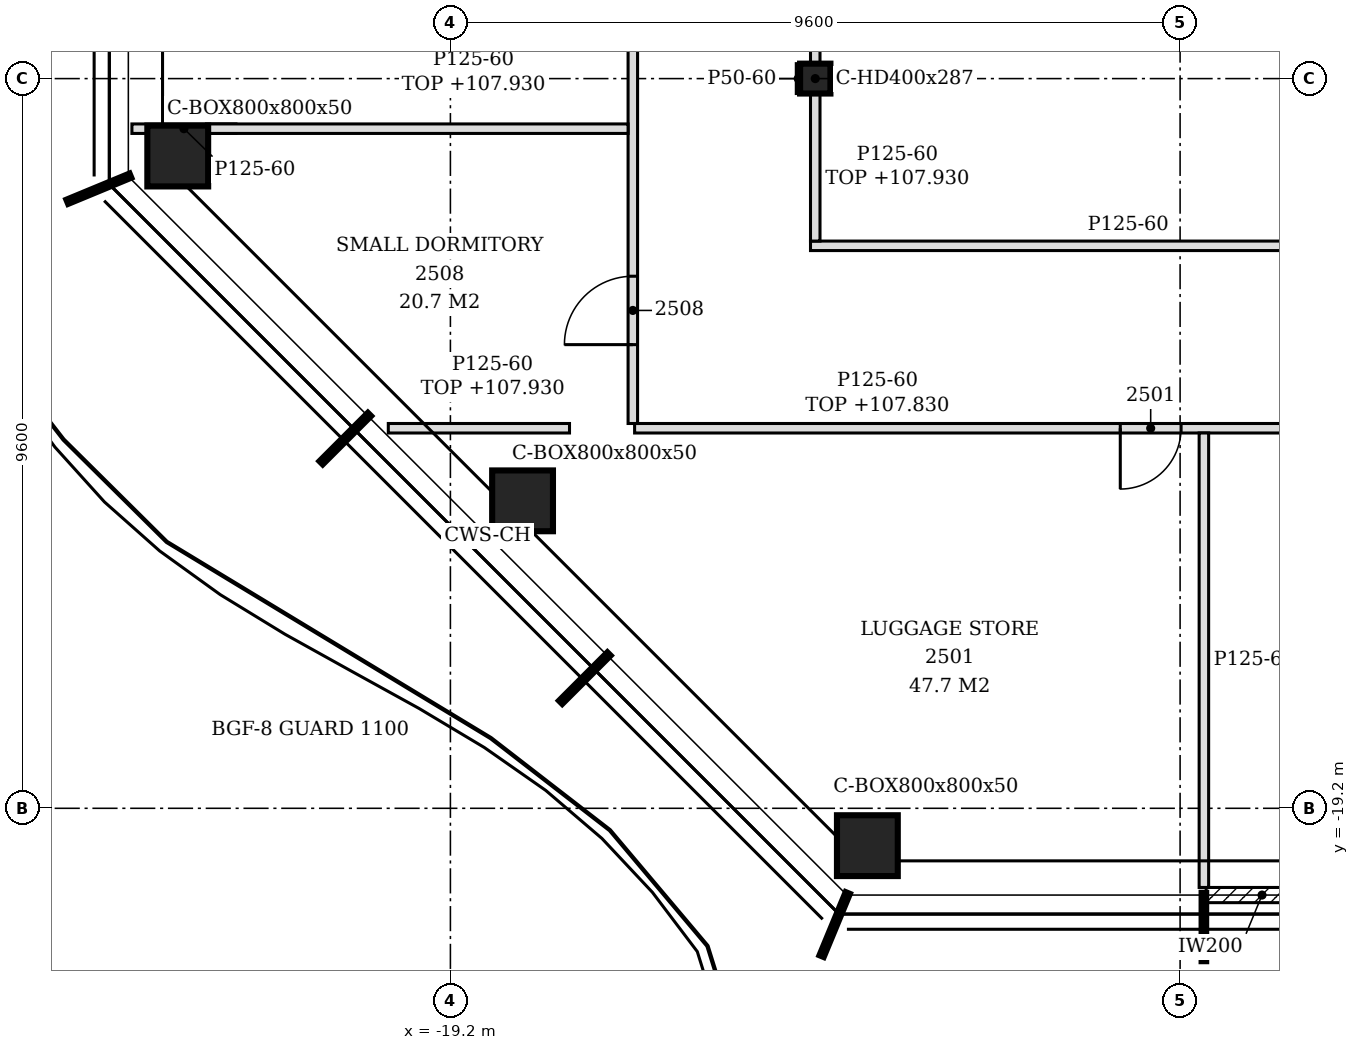
"""IFC4 building model, lengths in metres.
Left out: names, types, materials, properties, quantities, classifications, styles, units other than length and angle.
Written with IfcOpenShell. Run it as: python <this file> out.ifc"""

import sys

from ifc_helpers import new_model, si_unit, direction, frame, frame_2d, origin, origin_2d, place, context, subcontext, project, spatial, polyline, rectangle, hollow_rectangle, i_section, outline, extrude, clip, halfspace, element, fill, save


model = new_model("IFC4")
c1 = context("Model", 3, precision=1e-05, world=origin(), true_north=direction((0.0, 1.0)))
c2 = subcontext(c1, "Body", "Model", "MODEL_VIEW")
j1 = project(units=[si_unit("LENGTHUNIT", "METRE"), si_unit("PLANEANGLEUNIT", "RADIAN")], contexts=[c1])
p1 = place(None, origin())
s1 = spatial("IfcSite", under=j1, at=p1, CompositionType="ELEMENT")
p2 = place(p1, origin())
s2 = spatial("IfcBuilding", under=s1, at=p2, CompositionType="ELEMENT")
p3 = place(p2, frame((0.0, 0.0, 105.0)))
s3 = spatial("IfcBuildingStorey", under=s2, at=p3, CompositionType="ELEMENT", Elevation=105.0)
for number, where, z_axis, x_axis in (
    (1, (-13.714, -19.691, -0.15), (0.282, 0.188, 0.941), (-0.555, 0.832, 0.0)),
    (2, (-22.787, -10.619, -0.15), (0.282, 0.188, 0.941), (-0.555, 0.832, 0.0)),
    (3, (-18.251, -15.155, -0.15), (0.282, 0.188, 0.941), (-0.555, 0.832, 0.0)),
):
    element("IfcColumn", number, at=place(p3, frame(where, z_axis=z_axis, x_axis=x_axis)), inside=s3, PredefinedType="COLUMN", context=c2, shape_type="Clipping", body=[
        clip(clip(extrude(hollow_rectangle(XDim=0.8, YDim=0.8, WallThickness=0.05, at=origin_2d()), origin(), (0.0, 0.0, 1.0), 3.826), halfspace(frame((0.0, 0.0, 0.024), z_axis=(0.0, 0.0, 1.0), x_axis=(1.0, 0.0, 0.0)), True)), halfspace(frame((0.0, 0.0, 3.802), z_axis=(0.0, 0.0, 1.0), x_axis=(1.0, 0.0, 0.0)), False)),
    ])
p4 = place(p3, frame((-14.4, -9.6, -0.15), z_axis=(0.0, 0.0, 1.0), x_axis=(1.0, 0.0, 0.0)))
e4 = element("IfcColumn", 4, at=p4, inside=s3, PredefinedType="COLUMN", context=c2, shape_type="SweptSolid", body=[
    extrude(i_section(OverallWidth=0.399, OverallDepth=0.393, WebThickness=0.023, FlangeThickness=0.037, FilletRadius=0.015, at=origin_2d()), origin(), (0.0, 0.0, 1.0), 3.6),
])
p5 = place(p3, frame((-9.257, -20.341, 0.0), z_axis=(0.0, 0.0, 1.0), x_axis=(1.0, 0.0, 0.0)))
e5 = element("IfcWall", 5, at=p5, inside=s3, PredefinedType="NOTDEFINED", context=c2, shape_type="SweptSolid", body=[
    extrude(rectangle(XDim=4.74, YDim=0.2, at=frame_2d((2.37, 0.0))), origin(), (0.0, 0.0, 1.0), 3.45),
])
p6 = place(p5, frame((1.47, 0.0, 0.0)))
e6 = element("IfcOpeningElement", 6, at=p6, cuts=e5, PredefinedType="OPENING", context=c2, shape_type="SweptSolid", body=[
    extrude(rectangle(XDim=1.8, YDim=2.4, at=frame_2d((0.9, 1.2))), frame((0.0, 0.11, 0.0), z_axis=(0.0, -1.0, 0.0), x_axis=(1.0, 0.0, 0.0)), (0.0, 0.0, 1.0), 0.22),
])
p7 = place(p3, frame((-9.287, -20.241, 0.0), z_axis=(0.0, 0.0, 1.0), x_axis=(0.0, 1.0, 0.0)))
e7 = element("IfcWall", 7, at=p7, inside=s3, PredefinedType="PARTITIONING", context=c2, shape_type="SweptSolid", body=[
    extrude(outline(polyline([(0.0, 0.0), (5.979, 0.0), (5.979, 3.45), (5.269, 3.45), (5.267, 2.93), (5.069, 2.93), (5.067, 3.45), (1.419, 3.45), (1.417, 2.93), (1.119, 2.93), (1.117, 3.45), (0.0, 3.45), (0.0, 0.0)])), frame((0.0, 0.062, 0.0), z_axis=(0.0, -1.0, 0.0), x_axis=(1.0, 0.0, 0.0)), (0.0, 0.0, 1.0), 0.125),
])
p8 = place(p3, frame((-20.017, -14.2, 0.0), z_axis=(0.0, 0.0, 1.0), x_axis=(1.0, 0.0, 0.0)))
e8 = element("IfcWall", 8, at=p8, inside=s3, PredefinedType="PARTITIONING", context=c2, shape_type="SweptSolid", body=[
    extrude(outline(polyline([(0.0, 0.0), (2.384, 0.0), (2.384, 0.863), (2.384, 1.725), (2.384, 2.587), (2.384, 2.93), (0.0, 2.93), (0.0, 2.587), (0.0, 1.725), (0.0, 0.863), (0.0, 0.0)])), frame((0.0, 0.062, 0.0), z_axis=(0.0, -1.0, 0.0), x_axis=(1.0, 0.0, 0.0)), (0.0, 0.0, 1.0), 0.125),
])
p9 = place(p3, frame((-16.777, -14.2, 0.0), z_axis=(0.0, 0.0, 1.0), x_axis=(1.0, 0.0, 0.0)))
e9 = element("IfcWall", 9, at=p9, inside=s3, PredefinedType="PARTITIONING", context=c2, shape_type="SweptSolid", body=[
    extrude(outline(polyline([(0.0, 0.0), (42.177, 0.0), (42.177, 0.863), (42.177, 1.725), (42.177, 2.587), (42.177, 2.83), (0.0, 2.83), (0.0, 2.587), (0.0, 1.725), (0.0, 0.863), (0.0, 0.0)])), frame((0.0, 0.062, 0.0), z_axis=(0.0, -1.0, 0.0), x_axis=(1.0, 0.0, 0.0)), (0.0, 0.0, 1.0), 0.125),
])
p10 = place(p9, frame((6.39, 0.0, 0.0)))
e10 = element("IfcOpeningElement", 10, at=p10, cuts=e9, PredefinedType="OPENING", context=c2, shape_type="SweptSolid", body=[
    extrude(rectangle(XDim=0.8, YDim=2.1, at=frame_2d((0.4, 1.05))), frame((0.0, 0.073, 0.0), z_axis=(0.0, -1.0, 0.0), x_axis=(1.0, 0.0, 0.0)), (0.0, 0.0, 1.0), 0.145),
])
p11 = place(p9, frame((11.816, 0.0, 0.0)))
e11 = element("IfcOpeningElement", 11, at=p11, cuts=e9, PredefinedType="OPENING", context=c2, shape_type="SweptSolid", body=[
    extrude(rectangle(XDim=0.9, YDim=2.1, at=frame_2d((0.45, 1.05))), frame((0.0, 0.073, 0.0), z_axis=(0.0, -1.0, 0.0), x_axis=(1.0, 0.0, 0.0)), (0.0, 0.0, 1.0), 0.145),
])
p12 = place(p9, frame((15.89, 0.0, 0.0)))
e12 = element("IfcOpeningElement", 12, at=p12, cuts=e9, PredefinedType="OPENING", context=c2, shape_type="SweptSolid", body=[
    extrude(rectangle(XDim=0.9, YDim=2.1, at=frame_2d((0.45, 1.05))), frame((0.0, 0.073, 0.0), z_axis=(0.0, -1.0, 0.0), x_axis=(1.0, 0.0, 0.0)), (0.0, 0.0, 1.0), 0.145),
])
p13 = place(p9, frame((21.229, 0.0, 0.0)))
e13 = element("IfcOpeningElement", 13, at=p13, cuts=e9, PredefinedType="OPENING", context=c2, shape_type="SweptSolid", body=[
    extrude(rectangle(XDim=0.9, YDim=2.1, at=frame_2d((0.45, 1.05))), frame((0.0, 0.073, 0.0), z_axis=(0.0, -1.0, 0.0), x_axis=(1.0, 0.0, 0.0)), (0.0, 0.0, 1.0), 0.145),
])
p14 = place(p9, frame((25.49, 0.0, 0.0)))
e14 = element("IfcOpeningElement", 14, at=p14, cuts=e9, PredefinedType="OPENING", context=c2, shape_type="SweptSolid", body=[
    extrude(rectangle(XDim=0.9, YDim=2.1, at=frame_2d((0.45, 1.05))), frame((0.0, 0.073, 0.0), z_axis=(0.0, -1.0, 0.0), x_axis=(1.0, 0.0, 0.0)), (0.0, 0.0, 1.0), 0.145),
])
p15 = place(p9, frame((27.042, 0.0, 0.0)))
e15 = element("IfcOpeningElement", 15, at=p15, cuts=e9, PredefinedType="OPENING", context=c2, shape_type="SweptSolid", body=[
    extrude(rectangle(XDim=0.9, YDim=2.1, at=frame_2d((0.45, 1.05))), frame((0.0, 0.073, 0.0), z_axis=(0.0, -1.0, 0.0), x_axis=(1.0, 0.0, 0.0)), (0.0, 0.0, 1.0), 0.145),
])
p16 = place(p9, frame((33.977, 0.0, 0.0)))
e16 = element("IfcOpeningElement", 16, at=p16, cuts=e9, PredefinedType="OPENING", context=c2, shape_type="SweptSolid", body=[
    extrude(rectangle(XDim=0.9, YDim=2.1, at=frame_2d((0.45, 1.05))), frame((0.0, 0.073, 0.0), z_axis=(0.0, -1.0, 0.0), x_axis=(1.0, 0.0, 0.0)), (0.0, 0.0, 1.0), 0.145),
])
p17 = place(p9, frame((36.34, 0.0, 0.0)))
e17 = element("IfcOpeningElement", 17, at=p17, cuts=e9, PredefinedType="OPENING", context=c2, shape_type="SweptSolid", body=[
    extrude(rectangle(XDim=0.8, YDim=2.1, at=frame_2d((0.4, 1.05))), frame((0.0, 0.073, 0.0), z_axis=(0.0, -1.0, 0.0), x_axis=(1.0, 0.0, 0.0)), (0.0, 0.0, 1.0), 0.145),
])
p18 = place(p3, frame((-16.8, -14.137, 0.0), z_axis=(0.0, 0.0, 1.0), x_axis=(0.0, 1.0, 0.0)))
e18 = element("IfcWall", 18, at=p18, inside=s3, PredefinedType="PARTITIONING", context=c2, shape_type="SweptSolid", body=[
    extrude(outline(polyline([(0.0, 0.0), (36.554, 0.0), (36.554, 0.863), (36.554, 1.725), (36.554, 2.587), (36.554, 2.98), (0.0, 2.98), (0.0, 2.587), (0.0, 1.725), (0.0, 0.863), (0.0, 0.0)])), frame((0.0, 0.062, 0.0), z_axis=(0.0, -1.0, 0.0), x_axis=(1.0, 0.0, 0.0)), (0.0, 0.0, 1.0), 0.125),
])
p19 = place(p18, frame((1.038, 0.0, 0.0)))
e19 = element("IfcOpeningElement", 19, at=p19, cuts=e18, PredefinedType="OPENING", context=c2, shape_type="SweptSolid", body=[
    extrude(rectangle(XDim=0.9, YDim=2.1, at=frame_2d((0.45, 1.05))), frame((0.0, 0.073, 0.0), z_axis=(0.0, -1.0, 0.0), x_axis=(1.0, 0.0, 0.0)), (0.0, 0.0, 1.0), 0.145),
])
p20 = place(p18, frame((6.678, 0.0, 0.0)))
e20 = element("IfcOpeningElement", 20, at=p20, cuts=e18, PredefinedType="OPENING", context=c2, shape_type="SweptSolid", body=[
    extrude(rectangle(XDim=0.9, YDim=2.1, at=frame_2d((0.45, 1.05))), frame((0.0, 0.073, 0.0), z_axis=(0.0, -1.0, 0.0), x_axis=(1.0, 0.0, 0.0)), (0.0, 0.0, 1.0), 0.145),
])
p21 = place(p18, frame((9.646, 0.0, 0.0)))
e21 = element("IfcOpeningElement", 21, at=p21, cuts=e18, PredefinedType="OPENING", context=c2, shape_type="SweptSolid", body=[
    extrude(rectangle(XDim=0.9, YDim=2.1, at=frame_2d((0.45, 1.05))), frame((0.0, 0.073, 0.0), z_axis=(0.0, -1.0, 0.0), x_axis=(1.0, 0.0, 0.0)), (0.0, 0.0, 1.0), 0.145),
])
p22 = place(p18, frame((15.337, 0.0, 0.0)))
e22 = element("IfcOpeningElement", 22, at=p22, cuts=e18, PredefinedType="OPENING", context=c2, shape_type="SweptSolid", body=[
    extrude(rectangle(XDim=0.9, YDim=2.1, at=frame_2d((0.45, 1.05))), frame((0.0, 0.073, 0.0), z_axis=(0.0, -1.0, 0.0), x_axis=(1.0, 0.0, 0.0)), (0.0, 0.0, 1.0), 0.145),
])
p23 = place(p18, frame((17.846, 0.0, 0.0)))
e23 = element("IfcOpeningElement", 23, at=p23, cuts=e18, PredefinedType="OPENING", context=c2, shape_type="SweptSolid", body=[
    extrude(rectangle(XDim=0.9, YDim=2.1, at=frame_2d((0.45, 1.05))), frame((0.0, 0.073, 0.0), z_axis=(0.0, -1.0, 0.0), x_axis=(1.0, 0.0, 0.0)), (0.0, 0.0, 1.0), 0.145),
])
p24 = place(p18, frame((22.882, 0.0, 0.0)))
e24 = element("IfcOpeningElement", 24, at=p24, cuts=e18, PredefinedType="OPENING", context=c2, shape_type="SweptSolid", body=[
    extrude(rectangle(XDim=0.9, YDim=2.1, at=frame_2d((0.45, 1.05))), frame((0.0, 0.073, 0.0), z_axis=(0.0, -1.0, 0.0), x_axis=(1.0, 0.0, 0.0)), (0.0, 0.0, 1.0), 0.145),
])
p25 = place(p18, frame((27.637, 0.0, 0.0)))
e25 = element("IfcOpeningElement", 25, at=p25, cuts=e18, PredefinedType="OPENING", context=c2, shape_type="SweptSolid", body=[
    extrude(rectangle(XDim=0.9, YDim=2.1, at=frame_2d((0.45, 1.05))), frame((0.0, 0.073, 0.0), z_axis=(0.0, -1.0, 0.0), x_axis=(1.0, 0.0, 0.0)), (0.0, 0.0, 1.0), 0.145),
])
p26 = place(p18, frame((32.232, 0.0, 0.0)))
e26 = element("IfcOpeningElement", 26, at=p26, cuts=e18, PredefinedType="OPENING", context=c2, shape_type="SweptSolid", body=[
    extrude(rectangle(XDim=0.9, YDim=2.1, at=frame_2d((0.45, 1.05))), frame((0.0, 0.073, 0.0), z_axis=(0.0, -1.0, 0.0), x_axis=(1.0, 0.0, 0.0)), (0.0, 0.0, 1.0), 0.145),
])
p27 = place(p3, frame((-14.462, -11.8, 0.0), z_axis=(0.0, 0.0, 1.0), x_axis=(1.0, 0.0, 0.0)))
e27 = element("IfcWall", 27, at=p27, inside=s3, PredefinedType="PARTITIONING", context=c2, shape_type="SweptSolid", body=[
    extrude(outline(polyline([(0.0, 0.0), (14.525, 0.0), (14.525, 3.45), (9.812, 3.45), (9.811, 2.83), (9.512, 2.83), (9.51, 3.45), (0.212, 3.45), (0.21, 2.93), (0.0, 2.93), (0.0, 0.0)])), frame((0.0, 0.062, 0.0), z_axis=(0.0, -1.0, 0.0), x_axis=(1.0, 0.0, 0.0)), (0.0, 0.0, 1.0), 0.125),
])
p28 = place(p27, frame((8.363, 0.0, 0.0)))
e28 = element("IfcOpeningElement", 28, at=p28, cuts=e27, PredefinedType="OPENING", context=c2, shape_type="SweptSolid", body=[
    extrude(rectangle(XDim=0.9, YDim=2.1, at=frame_2d((0.45, 1.05))), frame((0.0, 0.073, 0.0), z_axis=(0.0, -1.0, 0.0), x_axis=(1.0, 0.0, 0.0)), (0.0, 0.0, 1.0), 0.145),
])
p29 = place(p3, frame((-14.4, -11.738, 0.0), z_axis=(0.0, 0.0, 1.0), x_axis=(0.0, 1.0, 0.0)))
e29 = element("IfcWall", 29, at=p29, inside=s3, PredefinedType="PARTITIONING", context=c2, shape_type="SweptSolid", body=[
    extrude(rectangle(XDim=1.941, YDim=0.125, at=frame_2d((0.971, 0.0))), origin(), (0.0, 0.0, 1.0), 2.93),
])
p30 = place(p3, frame((-23.39, -10.259, 0.0), z_axis=(0.0, 0.0, 1.0), x_axis=(1.0, 0.0, 0.0)))
e30 = element("IfcWall", 30, at=p30, inside=s3, PredefinedType="PARTITIONING", context=c2, shape_type="SweptSolid", body=[
    extrude(outline(polyline([(0.0, 0.0), (0.327, 0.0), (0.331, 0.863), (0.622, 1.725), (0.995, 2.587), (1.369, 3.45), (0.0, 3.45), (0.0, 2.587), (0.0, 1.725), (0.0, 0.863), (0.0, 0.0)])), frame((0.0, 0.062, 0.0), z_axis=(0.0, -1.0, 0.0), x_axis=(1.0, 0.0, 0.0)), (0.0, 0.0, 1.0), 0.125),
])
p31 = place(p3, frame((-22.409, -10.259, 0.0), z_axis=(0.0, 0.0, 1.0), x_axis=(1.0, 0.0, 0.0)))
e31 = element("IfcWall", 31, at=p31, inside=s3, PredefinedType="PARTITIONING", context=c2, shape_type="SweptSolid", body=[
    extrude(outline(polyline([(0.0, 0.0), (5.547, 0.0), (5.547, 0.863), (5.547, 1.725), (5.547, 2.587), (5.547, 2.93), (0.977, 2.93), (0.977, 2.587), (0.747, 1.725), (0.373, 0.863), (0.0, 0.0)])), frame((0.0, 0.062, 0.0), z_axis=(0.0, -1.0, 0.0), x_axis=(1.0, 0.0, 0.0)), (0.0, 0.0, 1.0), 0.125),
])
p32 = place(p3, frame((-14.4, -9.404, 0.0), z_axis=(0.0, 0.0, 1.0), x_axis=(0.0, 1.0, 0.0)))
e32 = element("IfcWall", 32, at=p32, inside=s3, PredefinedType="PARTITIONING", context=c2, shape_type="SweptSolid", body=[
    extrude(rectangle(XDim=9.207, YDim=0.125, at=frame_2d((4.604, 0.0))), origin(), (0.0, 0.0, 1.0), 2.93),
])
p33 = place(p3, frame((-14.625, -9.796, 0.0), z_axis=(0.0, 0.0, 1.0), x_axis=(0.0, 1.0, 0.0)))
e33 = element("IfcWall", 33, at=p33, inside=s3, PredefinedType="PARTITIONING", context=c2, shape_type="SweptSolid", body=[
    extrude(rectangle(XDim=0.393, YDim=0.05, at=frame_2d((0.196, 0.0))), origin(), (0.0, 0.0, 1.0), 3.45),
])
p34 = place(p10, frame((0.8, 0.0, 0.0), z_axis=(0.0, 0.0, 1.0), x_axis=(-1.0, 0.0, 0.0)))
e34 = element("IfcDoor", 34, at=p34, inside=s3, OperationType="SINGLE_SWING_RIGHT", PredefinedType="DOOR", context=c2, shape_type="SweptSolid", body=[
    extrude(rectangle(XDim=0.8, YDim=2.1, at=frame_2d((0.4, 1.05))), frame((0.0, 0.025, 0.0), z_axis=(0.0, -1.0, 0.0), x_axis=(1.0, 0.0, 0.0)), (0.0, 0.0, 1.0), 0.05),
])
fill(e10, e34)
p35 = place(p19, origin())
e35 = element("IfcDoor", 35, at=p35, inside=s3, OperationType="SINGLE_SWING_LEFT", PredefinedType="DOOR", context=c2, shape_type="SweptSolid", body=[
    extrude(rectangle(XDim=0.9, YDim=2.1, at=frame_2d((0.45, 1.05))), frame((0.0, 0.025, 0.0), z_axis=(0.0, -1.0, 0.0), x_axis=(1.0, 0.0, 0.0)), (0.0, 0.0, 1.0), 0.05),
])
fill(e19, e35)
save(model, sys.argv[1])
